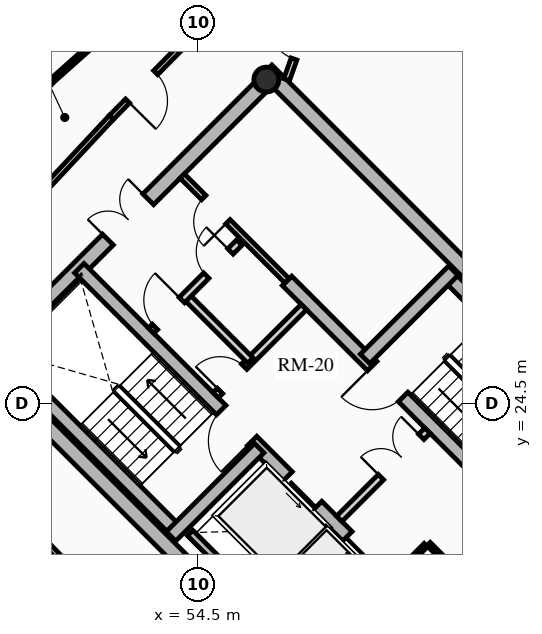
"""IFC4 building model, lengths in metres.
Left out: names, types, materials, properties, quantities, classifications, styles, units other than length and angle.
Written with IfcOpenShell. Run it as: python <this file> out.ifc"""

import sys

from ifc_helpers import new_model, si_unit, direction, frame, frame_2d, origin, origin_2d, place, context, subcontext, project, spatial, rectangle, hollow_circle, extrude, source, transform, mapped, element, fill, save


model = new_model("IFC4")
c1 = context("Model", 3, precision=1e-05, world=origin(), true_north=direction((0.0, 1.0)))
c2 = subcontext(c1, "Body", "Model", "MODEL_VIEW")
j1 = project(units=[si_unit("LENGTHUNIT", "METRE"), si_unit("PLANEANGLEUNIT", "RADIAN")], contexts=[c1])
p1 = place(None, origin())
s1 = spatial("IfcSite", under=j1, at=p1, CompositionType="ELEMENT")
p2 = place(p1, origin())
s2 = spatial("IfcBuilding", under=s1, at=p2, CompositionType="ELEMENT")
p3 = place(p2, frame((0.0, 0.0, 217.03)))
s3 = spatial("IfcBuildingStorey", under=s2, at=p3, CompositionType="ELEMENT", Elevation=217.03)
for number, where, z_axis, x_axis in (
    (1, (58.702, 15.732, 0.0), (0.0, 0.0, 1.0), (-0.707, 0.707, 0.0)),
    (2, (66.268, 23.298, 0.0), (0.0, 0.0, 1.0), (-0.707, 0.707, 0.0)),
):
    element("IfcWall", number, at=place(p3, frame(where, z_axis=z_axis, x_axis=x_axis)), inside=s3, PredefinedType="SHEAR", context=c2, shape_type="SweptSolid", body=[
        extrude(rectangle(XDim=14.1, YDim=0.4, at=frame_2d((7.05, 0.0))), origin(), (0.0, 0.0, 1.0), 2.91),
    ])
p4 = place(p3, frame((58.561, 15.873, 0.0), z_axis=(0.0, 0.0, 1.0), x_axis=(0.707106781187, 0.707106781187, 0.0)))
e3 = element("IfcWall", 3, at=p4, inside=s3, PredefinedType="SHEAR", context=c2, shape_type="SweptSolid", body=[
    extrude(rectangle(XDim=10.7, YDim=0.4, at=frame_2d((5.35, 0.0))), origin(), (0.0, 0.0, 1.0), 2.91),
])
m1 = source(origin(), c2, "Body", "SweptSolid", [
    extrude(rectangle(XDim=1.5, YDim=2.02, at=frame_2d((0.75, 1.01))), frame((0.0, 0.21, 0.0), z_axis=(0.0, -1.0, 0.0), x_axis=(1.0, 0.0, 0.0)), (0.0, 0.0, 1.0), 0.42),
])
p5 = place(p4, frame((5.45, 0.0, 0.0)))
e4 = element("IfcOpeningElement", 4, at=p5, cuts=e3, PredefinedType="OPENING", context=c2, shape_type="MappedRepresentation", body=[
    mapped(m1, transform((0.0, 0.0, 0.0), x_axis=(1.0, 0.0, 0.0), y_axis=(0.0, 1.0, 0.0), z_axis=(0.0, 0.0, 1.0), scale=1.0)),
])
p6 = place(p3, frame((48.873, 25.561, 0.0), z_axis=(0.0, 0.0, 1.0), x_axis=(0.707106781187, 0.707106781187, 0.0)))
e5 = element("IfcWall", 5, at=p6, inside=s3, PredefinedType="SHEAR", context=c2, shape_type="SweptSolid", body=[
    extrude(rectangle(XDim=10.7, YDim=0.4, at=frame_2d((5.35, 0.0))), origin(), (0.0, 0.0, 1.0), 2.91),
])
p7 = place(p6, frame((4.6, 0.0, 0.0)))
e6 = element("IfcOpeningElement", 6, at=p7, cuts=e5, PredefinedType="OPENING", context=c2, shape_type="MappedRepresentation", body=[
    mapped(m1, transform((0.0, 0.0, 0.0), x_axis=(1.0, 0.0, 0.0), y_axis=(0.0, 1.0, 0.0), z_axis=(0.0, 0.0, 1.0), scale=1.0)),
])
p8 = place(p3, frame((61.06, 18.373, 0.0), z_axis=(0.0, 0.0, 1.0), x_axis=(-0.707106781187, 0.707106781187, 0.0)))
e7 = element("IfcWall", 7, at=p8, inside=s3, PredefinedType="SHEAR", context=c2, shape_type="SweptSolid", body=[
    extrude(rectangle(XDim=13.7, YDim=0.35, at=frame_2d((6.85, 0.0))), origin(), (0.0, 0.0, 1.0), 2.91),
])
m2 = source(origin(), c2, "Body", "SweptSolid", [
    extrude(rectangle(XDim=1.1, YDim=2.015, at=frame_2d((0.55, 1.007))), frame((0.0, 0.185, 0.0), z_axis=(0.0, -1.0, 0.0), x_axis=(1.0, 0.0, 0.0)), (0.0, 0.0, 1.0), 0.37),
])
p9 = place(p8, frame((4.85, 0.0, 0.0)))
e8 = element("IfcOpeningElement", 8, at=p9, cuts=e7, PredefinedType="OPENING", context=c2, shape_type="MappedRepresentation", body=[
    mapped(m2, transform((0.0, 0.0, 0.0), x_axis=(1.0, 0.0, 0.0), y_axis=(0.0, 1.0, 0.0), z_axis=(0.0, 0.0, 1.0), scale=1.0)),
])
p10 = place(p8, frame((0.625, 0.0, 0.0)))
e9 = element("IfcOpeningElement", 9, at=p10, cuts=e7, PredefinedType="OPENING", context=c2, shape_type="MappedRepresentation", body=[
    mapped(m2, transform((0.0, 0.0, 0.0), x_axis=(1.0, 0.0, 0.0), y_axis=(0.0, 1.0, 0.0), z_axis=(0.0, 0.0, 1.0), scale=1.0)),
])
p11 = place(p8, frame((2.625, 0.0, 0.0)))
e10 = element("IfcOpeningElement", 10, at=p11, cuts=e7, PredefinedType="OPENING", context=c2, shape_type="MappedRepresentation", body=[
    mapped(m2, transform((0.0, 0.0, 0.0), x_axis=(1.0, 0.0, 0.0), y_axis=(0.0, 1.0, 0.0), z_axis=(0.0, 0.0, 1.0), scale=1.0)),
])
m3 = source(origin(), c2, "Body", "SweptSolid", [
    extrude(rectangle(XDim=1.15, YDim=2.02, at=frame_2d((0.575, 1.01))), frame((0.0, 0.185, 0.0), z_axis=(0.0, -1.0, 0.0), x_axis=(1.0, 0.0, 0.0)), (0.0, 0.0, 1.0), 0.37),
])
p12 = place(p8, frame((7.27, 0.0, 0.0)))
e11 = element("IfcOpeningElement", 11, at=p12, cuts=e7, PredefinedType="OPENING", context=c2, shape_type="MappedRepresentation", body=[
    mapped(m3, transform((0.0, 0.0, 0.0), x_axis=(1.0, 0.0, 0.0), y_axis=(0.0, 1.0, 0.0), z_axis=(0.0, 0.0, 1.0), scale=1.0)),
])
p13 = place(p3, frame((63.627, 20.94, 0.0), z_axis=(0.0, 0.0, 1.0), x_axis=(-0.707119496762, 0.707094065383, 0.0)))
e12 = element("IfcWall", 12, at=p13, inside=s3, PredefinedType="SHEAR", context=c2, shape_type="SweptSolid", body=[
    extrude(rectangle(XDim=9.6, YDim=0.35, at=frame_2d((4.8, 0.0))), origin(), (0.0, 0.0, 1.0), 2.91),
])
p14 = place(p13, frame((5.28, 0.0, 0.0)))
e13 = element("IfcOpeningElement", 13, at=p14, cuts=e12, PredefinedType="OPENING", context=c2, shape_type="MappedRepresentation", body=[
    mapped(m3, transform((0.0, 0.0, 0.0), x_axis=(1.0, 0.0, 0.0), y_axis=(0.0, 1.0, 0.0), z_axis=(0.0, 0.0, 1.0), scale=1.0)),
])
p15 = place(p3, frame((53.922, 21.141, 0.0), z_axis=(0.0, 0.0, 1.0), x_axis=(-0.707106781187, 0.707106781187, 0.0)))
e14 = element("IfcWall", 14, at=p15, inside=s3, PredefinedType="SHEAR", context=c2, shape_type="SweptSolid", body=[
    extrude(rectangle(XDim=6.695, YDim=0.35, at=frame_2d((3.348, 0.0))), origin(), (0.0, 0.0, 1.0), 2.91),
])
p16 = place(p3, frame((53.784, 21.003, 0.0), z_axis=(0.0, 0.0, 1.0), x_axis=(0.707106781187, 0.707106781187, 0.0)))
e15 = element("IfcWall", 15, at=p16, inside=s3, PredefinedType="SHEAR", context=c2, shape_type="SweptSolid", body=[
    extrude(rectangle(XDim=3.285, YDim=0.35, at=frame_2d((1.643, 0.0))), origin(), (0.0, 0.0, 1.0), 2.91),
])
p17 = place(p3, frame((65.812, 23.125, 0.0), z_axis=(0.0, 0.0, 1.0), x_axis=(-0.707106781187, 0.707106781187, 0.0)))
e16 = element("IfcWall", 16, at=p17, inside=s3, PredefinedType="SHEAR", context=c2, shape_type="SweptSolid", body=[
    extrude(rectangle(XDim=6.695, YDim=0.35, at=frame_2d((3.348, 0.0))), origin(), (0.0, 0.0, 1.0), 2.91),
])
p18 = place(p3, frame((58.893, 25.674, 0.0), z_axis=(0.0, 0.0, 1.0), x_axis=(0.707106781187, 0.707106781187, 0.0)))
e17 = element("IfcWall", 17, at=p18, inside=s3, PredefinedType="SHEAR", context=c2, shape_type="SweptSolid", body=[
    extrude(rectangle(XDim=3.285, YDim=0.35, at=frame_2d((1.643, 0.0))), origin(), (0.0, 0.0, 1.0), 2.91),
])
p19 = place(p3, frame((56.294, 33.024, 0.0), z_axis=(0.0, 0.0, 1.0), x_axis=(0.707106781187, 0.707106781187, 0.0)))
e18 = element("IfcColumn", 18, at=p19, inside=s3, PredefinedType="COLUMN", context=c2, shape_type="SweptSolid", body=[
    extrude(hollow_circle(Radius=0.33, WallThickness=0.025, at=origin_2d()), origin(), (0.0, 0.0, 1.0), 2.91),
])
p20 = place(p3, frame((55.888, 19.069, 0.0), z_axis=(0.0, 0.0, 1.0), x_axis=(0.707106781187, 0.707106781187, 0.0)))
e19 = element("IfcWall", 19, at=p20, inside=s3, PredefinedType="SHEAR", context=c2, shape_type="SweptSolid", body=[
    extrude(rectangle(XDim=2.97, YDim=0.2, at=frame_2d((1.485, 0.0))), origin(), (0.0, 0.0, 1.0), 2.91),
])
p21 = place(p3, frame((56.015, 19.366, 0.0), z_axis=(0.0, 0.0, 1.0), x_axis=(-0.707106781187, 0.707106781187, 0.0)))
e20 = element("IfcWall", 20, at=p21, inside=s3, PredefinedType="SHEAR", context=c2, shape_type="SweptSolid", body=[
    extrude(rectangle(XDim=2.44, YDim=0.2, at=frame_2d((1.22, 0.0))), origin(), (0.0, 0.0, 1.0), 2.91),
])
p22 = place(p3, frame((58.214, 21.467, 0.0), z_axis=(0.0, 0.0, 1.0), x_axis=(0.707106781187, 0.707106781187, 0.0)))
e21 = element("IfcWall", 21, at=p22, inside=s3, PredefinedType="PARTITIONING", context=c2, shape_type="SweptSolid", body=[
    extrude(rectangle(XDim=3.28, YDim=0.2, at=frame_2d((1.64, 0.0))), origin(), (0.0, 0.0, 1.0), 2.685),
])
m4 = source(origin(), c2, "Body", "SweptSolid", [
    extrude(rectangle(XDim=1.5, YDim=2.02, at=frame_2d((0.75, 1.01))), frame((0.0, 0.11, 0.0), z_axis=(0.0, -1.0, 0.0), x_axis=(1.0, 0.0, 0.0)), (0.0, 0.0, 1.0), 0.22),
])
p23 = place(p22, frame((1.55, 0.0, 0.0)))
e22 = element("IfcOpeningElement", 22, at=p23, cuts=e21, PredefinedType="OPENING", context=c2, shape_type="MappedRepresentation", body=[
    mapped(m4, transform((0.0, 0.0, 0.0), x_axis=(1.0, 0.0, 0.0), y_axis=(0.0, 1.0, 0.0), z_axis=(0.0, 0.0, 1.0), scale=1.0)),
])
p24 = place(p3, frame((54.961, 24.719, 0.0), z_axis=(0.0, 0.0, 1.0), x_axis=(0.707106781187, 0.707106781187, 0.0)))
e23 = element("IfcWall", 23, at=p24, inside=s3, PredefinedType="PARTITIONING", context=c2, shape_type="SweptSolid", body=[
    extrude(rectangle(XDim=3.28, YDim=0.2, at=frame_2d((1.64, 0.0))), origin(), (0.0, 0.0, 1.0), 2.685),
])
m5 = source(origin(), c2, "Body", "SweptSolid", [
    extrude(rectangle(XDim=0.9, YDim=2.005, at=frame_2d((0.45, 1.002))), frame((0.0, 0.11, 0.0), z_axis=(0.0, -1.0, 0.0), x_axis=(1.0, 0.0, 0.0)), (0.0, 0.0, 1.0), 0.22),
])
p25 = place(p24, frame((0.16, 0.0, 0.0)))
e24 = element("IfcOpeningElement", 24, at=p25, cuts=e23, PredefinedType="OPENING", context=c2, shape_type="MappedRepresentation", body=[
    mapped(m5, transform((0.0, 0.0, 0.0), x_axis=(1.0, 0.0, 0.0), y_axis=(0.0, 1.0, 0.0), z_axis=(0.0, 0.0, 1.0), scale=1.0)),
])
p26 = place(p3, frame((55.874, 25.631, 0.0), z_axis=(0.0, 0.0, 1.0), x_axis=(-0.707157639372, 0.707055919343, 0.0)))
e25 = element("IfcWall", 25, at=p26, inside=s3, PredefinedType="PARTITIONING", context=c2, shape_type="SweptSolid", body=[
    extrude(rectangle(XDim=2.4, YDim=0.2, at=frame_2d((1.2, 0.0))), origin(), (0.0, 0.0, 1.0), 2.685),
])
p27 = place(p3, frame((53.264, 26.416, 0.0), z_axis=(0.0, 0.0, 1.0), x_axis=(0.707106781187, 0.707106781187, 0.0)))
e26 = element("IfcWall", 26, at=p27, inside=s3, PredefinedType="PARTITIONING", context=c2, shape_type="SweptSolid", body=[
    extrude(rectangle(XDim=3.28, YDim=0.2, at=frame_2d((1.64, 0.0))), origin(), (0.0, 0.0, 1.0), 2.685),
])
m6 = source(origin(), c2, "Body", "SweptSolid", [
    extrude(rectangle(XDim=1.0, YDim=2.015, at=frame_2d((0.5, 1.007))), frame((0.0, 0.11, 0.0), z_axis=(0.0, -1.0, 0.0), x_axis=(1.0, 0.0, 0.0)), (0.0, 0.0, 1.0), 0.22),
])
p28 = place(p27, frame((0.14, 0.0, 0.0)))
e27 = element("IfcOpeningElement", 27, at=p28, cuts=e26, PredefinedType="OPENING", context=c2, shape_type="MappedRepresentation", body=[
    mapped(m6, transform((0.0, 0.0, 0.0), x_axis=(1.0, 0.0, 0.0), y_axis=(0.0, 1.0, 0.0), z_axis=(0.0, 0.0, 1.0), scale=1.0)),
])
p29 = place(p27, frame((2.05, 0.0, 0.0)))
e28 = element("IfcOpeningElement", 28, at=p29, cuts=e26, PredefinedType="OPENING", context=c2, shape_type="MappedRepresentation", body=[
    mapped(m5, transform((0.0, 0.0, 0.0), x_axis=(1.0, 0.0, 0.0), y_axis=(0.0, 1.0, 0.0), z_axis=(0.0, 0.0, 1.0), scale=1.0)),
])
p30 = place(p3, frame((61.835, 19.529, 0.0), z_axis=(0.0, 0.0, 1.0), x_axis=(-0.707174592913, 0.707038962956, 0.0)))
e29 = element("IfcWall", 29, at=p30, inside=s3, PredefinedType="PARTITIONING", context=c2, shape_type="SweptSolid", body=[
    extrude(rectangle(XDim=1.8, YDim=0.125, at=frame_2d((0.9, 0.0))), origin(), (0.0, 0.0, 1.0), 2.685),
])
m7 = source(origin(), c2, "Body", "SweptSolid", [
    extrude(rectangle(XDim=0.9, YDim=2.005, at=frame_2d((0.45, 1.002))), frame((0.0, 0.073, 0.0), z_axis=(0.0, -1.0, 0.0), x_axis=(1.0, 0.0, 0.0)), (0.0, 0.0, 1.0), 0.145),
])
p31 = place(p30, frame((0.42, 0.0, 0.0)))
e30 = element("IfcOpeningElement", 30, at=p31, cuts=e29, PredefinedType="OPENING", context=c2, shape_type="MappedRepresentation", body=[
    mapped(m7, transform((0.0, 0.0, 0.0), x_axis=(1.0, 0.0, 0.0), y_axis=(0.0, 1.0, 0.0), z_axis=(0.0, 0.0, 1.0), scale=1.0)),
])
p32 = place(p3, frame((59.713, 19.996, 0.0), z_axis=(0.0, 0.0, 1.0), x_axis=(0.707217726, 0.706995818963, 0.0)))
e31 = element("IfcWall", 31, at=p32, inside=s3, PredefinedType="PARTITIONING", context=c2, shape_type="SweptSolid", body=[
    extrude(rectangle(XDim=1.1, YDim=0.125, at=frame_2d((0.55, 0.0))), origin(), (0.0, 0.0, 1.0), 2.685),
])
p33 = place(p3, frame((56.839, 27.728, 0.0), z_axis=(0.0, 0.0, 1.0), x_axis=(-0.707106781187, 0.707106781187, 0.0)))
e32 = element("IfcWall", 32, at=p33, inside=s3, PredefinedType="PARTITIONING", context=c2, shape_type="SweptSolid", body=[
    extrude(rectangle(XDim=3.9, YDim=0.16, at=frame_2d((1.95, 0.0))), origin(), (0.0, 0.0, 1.0), 2.685),
])
m8 = source(origin(), c2, "Body", "SweptSolid", [
    extrude(rectangle(XDim=0.9, YDim=2.005, at=frame_2d((0.45, 1.002))), frame((0.0, 0.09, 0.0), z_axis=(0.0, -1.0, 0.0), x_axis=(1.0, 0.0, 0.0)), (0.0, 0.0, 1.0), 0.18),
])
p34 = place(p33, frame((2.2, 0.0, 0.0)))
e33 = element("IfcOpeningElement", 33, at=p34, cuts=e32, PredefinedType="OPENING", context=c2, shape_type="MappedRepresentation", body=[
    mapped(m8, transform((0.0, 0.0, 0.0), x_axis=(1.0, 0.0, 0.0), y_axis=(0.0, 1.0, 0.0), z_axis=(0.0, 0.0, 1.0), scale=1.0)),
])
p35 = place(p3, frame((54.506, 34.344, 0.0), z_axis=(0.0, 0.0, 1.0), x_axis=(-0.703053402247, -0.711137056824, 0.0)))
e34 = element("IfcWall", 34, at=p35, inside=s3, PredefinedType="PARTITIONING", context=c2, shape_type="SweptSolid", body=[
    extrude(rectangle(XDim=3.262, YDim=0.15, at=frame_2d((1.631, 0.0))), origin(), (0.0, 0.0, 1.0), 2.322),
])
m9 = source(origin(), c2, "Body", "SweptSolid", [
    extrude(rectangle(XDim=1.05, YDim=2.015, at=frame_2d((0.525, 1.007))), frame((0.0, 0.085, 0.0), z_axis=(0.0, -1.0, 0.0), x_axis=(1.0, 0.0, 0.0)), (0.0, 0.0, 1.0), 0.17),
])
p36 = place(p35, frame((1.599, 0.0, 0.0)))
e35 = element("IfcOpeningElement", 35, at=p36, cuts=e34, PredefinedType="OPENING", context=c2, shape_type="MappedRepresentation", body=[
    mapped(m9, transform((0.0, 0.0, 0.0), x_axis=(1.0, 0.0, 0.0), y_axis=(0.0, 1.0, 0.0), z_axis=(0.0, 0.0, 1.0), scale=1.0)),
])
p37 = place(p3, frame((52.212, 32.024, 0.0), z_axis=(0.0, 0.0, 1.0), x_axis=(-0.682158998173, -0.731203871169, 0.0)))
e36 = element("IfcWall", 36, at=p37, inside=s3, PredefinedType="PARTITIONING", context=c2, shape_type="SweptSolid", body=[
    extrude(rectangle(XDim=6.282, YDim=0.15, at=frame_2d((3.141, 0.0))), origin(), (0.0, 0.0, 1.0), 2.255),
])
p38 = place(p3, frame((48.052, 23.323, 0.0), z_axis=(0.0, 0.0, 1.0), x_axis=(0.696573981306, -0.717484974454, 0.0)))
e37 = element("IfcWall", 37, at=p38, inside=s3, PredefinedType="PARTITIONING", context=c2, shape_type="SweptSolid", body=[
    extrude(rectangle(XDim=5.849, YDim=0.15, at=frame_2d((2.925, 0.0))), origin(), (0.0, 0.0, 1.0), 2.685),
])
p39 = place(p3, frame((56.828, 33.021, 0.0), z_axis=(0.0, 0.0, 1.0), x_axis=(0.334788446034, 0.942293317605, 0.0)))
e38 = element("IfcWall", 38, at=p39, inside=s3, PredefinedType="PARTITIONING", context=c2, shape_type="SweptSolid", body=[
    extrude(rectangle(XDim=1.829, YDim=0.16, at=frame_2d((0.915, 0.0))), origin(), (0.0, 0.0, 1.0), 2.255),
])
m10 = source(origin(), c2, "Body", "SweptSolid", [
    extrude(rectangle(XDim=1.05, YDim=2.015, at=frame_2d((0.525, 1.007))), frame((0.0, 0.09, 0.0), z_axis=(0.0, -1.0, 0.0), x_axis=(1.0, 0.0, 0.0)), (0.0, 0.0, 1.0), 0.18),
])
p40 = place(p39, frame((0.579, 0.0, 0.0)))
e39 = element("IfcOpeningElement", 39, at=p40, cuts=e38, PredefinedType="OPENING", context=c2, shape_type="MappedRepresentation", body=[
    mapped(m10, transform((0.0, 0.0, 0.0), x_axis=(1.0, 0.0, 0.0), y_axis=(0.0, 1.0, 0.0), z_axis=(0.0, 0.0, 1.0), scale=1.0)),
])
p41 = place(p3, frame((53.206, 35.268, 0.0), z_axis=(0.0, 0.0, 1.0), x_axis=(-0.746677760999, -0.665185929819, 0.0)))
e40 = element("IfcWall", 40, at=p41, inside=s3, PredefinedType="PARTITIONING", context=c2, shape_type="SweptSolid", body=[
    extrude(rectangle(XDim=3.445, YDim=0.125, at=frame_2d((1.723, 0.0))), origin(), (0.0, 0.0, 1.0), 2.322),
])
p42 = place(p3, frame((50.634, 32.977, 0.0), z_axis=(0.0, 0.0, 1.0), x_axis=(-0.659241945747, -0.751930885765, 0.0)))
e41 = element("IfcWall", 41, at=p42, inside=s3, PredefinedType="PARTITIONING", context=c2, shape_type="SweptSolid", body=[
    extrude(rectangle(XDim=5.624, YDim=0.125, at=frame_2d((2.812, 0.0))), origin(), (0.0, 0.0, 1.0), 2.255),
])
p43 = place(p42, frame((2.362, 0.0, 0.0)))
e42 = element("IfcOpeningElement", 42, at=p43, cuts=e41, PredefinedType="OPENING", context=c2, shape_type="MappedRepresentation", body=[
    mapped(m7, transform((0.0, 0.0, 0.0), x_axis=(1.0, 0.0, 0.0), y_axis=(0.0, 1.0, 0.0), z_axis=(0.0, 0.0, 1.0), scale=1.0)),
])
p44 = place(p3, frame((47.377, 22.223, 0.0), z_axis=(0.0, 0.0, 1.0), x_axis=(0.676554417653, -0.736392639802, 0.0)))
e43 = element("IfcWall", 43, at=p44, inside=s3, PredefinedType="PARTITIONING", context=c2, shape_type="SweptSolid", body=[
    extrude(rectangle(XDim=5.553, YDim=0.125, at=frame_2d((2.776, 0.0))), origin(), (0.0, 0.0, 1.0), 2.685),
])
p45 = place(p44, frame((2.326, 0.0, 0.0)))
e44 = element("IfcOpeningElement", 44, at=p45, cuts=e43, PredefinedType="OPENING", context=c2, shape_type="MappedRepresentation", body=[
    mapped(m7, transform((0.0, 0.0, 0.0), x_axis=(1.0, 0.0, 0.0), y_axis=(0.0, 1.0, 0.0), z_axis=(0.0, 0.0, 1.0), scale=1.0)),
])
m11 = source(origin(), c2, "Body", "SweptSolid", [
    extrude(rectangle(XDim=1.1, YDim=2.015, at=frame_2d((0.55, 1.007))), frame((0.0, 0.025, 0.0), z_axis=(0.0, -1.0, 0.0), x_axis=(1.0, 0.0, 0.0)), (0.0, 0.0, 1.0), 0.05),
])
p46 = place(p9, origin())
e45 = element("IfcDoor", 45, at=p46, inside=s3, OperationType="SLIDING_TO_LEFT", PredefinedType="DOOR", context=c2, shape_type="MappedRepresentation", body=[
    mapped(m11, transform((0.0, 0.0, 0.0), x_axis=(1.0, 0.0, 0.0), y_axis=(0.0, 1.0, 0.0), z_axis=(0.0, 0.0, 1.0), scale=1.0)),
])
fill(e8, e45)
p47 = place(p11, origin())
e46 = element("IfcDoor", 46, at=p47, inside=s3, OperationType="SLIDING_TO_RIGHT", PredefinedType="DOOR", context=c2, shape_type="MappedRepresentation", body=[
    mapped(m11, transform((0.0, 0.0, 0.0), x_axis=(1.0, 0.0, 0.0), y_axis=(0.0, 1.0, 0.0), z_axis=(0.0, 0.0, 1.0), scale=1.0)),
])
fill(e10, e46)
m12 = source(origin(), c2, "Body", "SweptSolid", [
    extrude(rectangle(XDim=1.15, YDim=2.02, at=frame_2d((0.575, 1.01))), frame((0.0, 0.025, 0.0), z_axis=(0.0, -1.0, 0.0), x_axis=(1.0, 0.0, 0.0)), (0.0, 0.0, 1.0), 0.05),
])
p48 = place(p12, origin())
e47 = element("IfcDoor", 47, at=p48, inside=s3, OperationType="SINGLE_SWING_LEFT", PredefinedType="DOOR", context=c2, shape_type="MappedRepresentation", body=[
    mapped(m12, transform((0.0, 0.0, 0.0), x_axis=(1.0, 0.0, 0.0), y_axis=(0.0, 1.0, 0.0), z_axis=(0.0, 0.0, 1.0), scale=1.0)),
])
fill(e11, e47)
p49 = place(p14, origin())
e48 = element("IfcDoor", 48, at=p49, inside=s3, OperationType="SINGLE_SWING_RIGHT", PredefinedType="DOOR", context=c2, shape_type="MappedRepresentation", body=[
    mapped(m12, transform((0.0, 0.0, 0.0), x_axis=(1.0, 0.0, 0.0), y_axis=(0.0, 1.0, 0.0), z_axis=(0.0, 0.0, 1.0), scale=1.0)),
])
fill(e13, e48)
m13 = source(origin(), c2, "Body", "SweptSolid", [
    extrude(rectangle(XDim=1.5, YDim=2.02, at=frame_2d((0.75, 1.01))), frame((0.0, 0.025, 0.0), z_axis=(0.0, -1.0, 0.0), x_axis=(1.0, 0.0, 0.0)), (0.0, 0.0, 1.0), 0.05),
])
p50 = place(p7, origin())
e49 = element("IfcDoor", 49, at=p50, inside=s3, OperationType="DOUBLE_DOOR_SINGLE_SWING", PredefinedType="DOOR", context=c2, shape_type="MappedRepresentation", body=[
    mapped(m13, transform((0.0, 0.0, 0.0), x_axis=(1.0, 0.0, 0.0), y_axis=(0.0, 1.0, 0.0), z_axis=(0.0, 0.0, 1.0), scale=1.0)),
])
fill(e6, e49)
p51 = place(p23, origin())
e50 = element("IfcDoor", 50, at=p51, inside=s3, OperationType="DOUBLE_DOOR_SINGLE_SWING", PredefinedType="DOOR", context=c2, shape_type="MappedRepresentation", body=[
    mapped(m13, transform((0.0, 0.0, 0.0), x_axis=(1.0, 0.0, 0.0), y_axis=(0.0, 1.0, 0.0), z_axis=(0.0, 0.0, 1.0), scale=1.0)),
])
fill(e22, e50)
m14 = source(origin(), c2, "Body", "SweptSolid", [
    extrude(rectangle(XDim=0.9, YDim=2.005, at=frame_2d((0.45, 1.002))), frame((0.0, 0.025, 0.0), z_axis=(0.0, -1.0, 0.0), x_axis=(1.0, 0.0, 0.0)), (0.0, 0.0, 1.0), 0.05),
])
p52 = place(p25, origin())
e51 = element("IfcDoor", 51, at=p52, inside=s3, OperationType="SINGLE_SWING_LEFT", PredefinedType="DOOR", context=c2, shape_type="MappedRepresentation", body=[
    mapped(m14, transform((0.0, 0.0, 0.0), x_axis=(1.0, 0.0, 0.0), y_axis=(0.0, 1.0, 0.0), z_axis=(0.0, 0.0, 1.0), scale=1.0)),
])
fill(e24, e51)
m15 = source(origin(), c2, "Body", "SweptSolid", [
    extrude(rectangle(XDim=1.0, YDim=2.015, at=frame_2d((0.5, 1.007))), frame((0.0, 0.025, 0.0), z_axis=(0.0, -1.0, 0.0), x_axis=(1.0, 0.0, 0.0)), (0.0, 0.0, 1.0), 0.05),
])
p53 = place(p28, origin())
e52 = element("IfcDoor", 52, at=p53, inside=s3, OperationType="SINGLE_SWING_RIGHT", PredefinedType="DOOR", context=c2, shape_type="MappedRepresentation", body=[
    mapped(m15, transform((0.0, 0.0, 0.0), x_axis=(1.0, 0.0, 0.0), y_axis=(0.0, 1.0, 0.0), z_axis=(0.0, 0.0, 1.0), scale=1.0)),
])
fill(e27, e52)
p54 = place(p29, origin())
e53 = element("IfcDoor", 53, at=p54, inside=s3, OperationType="SINGLE_SWING_RIGHT", PredefinedType="DOOR", context=c2, shape_type="MappedRepresentation", body=[
    mapped(m14, transform((0.0, 0.0, 0.0), x_axis=(1.0, 0.0, 0.0), y_axis=(0.0, 1.0, 0.0), z_axis=(0.0, 0.0, 1.0), scale=1.0)),
])
fill(e28, e53)
p55 = place(p34, origin())
e54 = element("IfcDoor", 54, at=p55, inside=s3, OperationType="SINGLE_SWING_LEFT", PredefinedType="DOOR", context=c2, shape_type="MappedRepresentation", body=[
    mapped(m14, transform((0.0, 0.0, 0.0), x_axis=(1.0, 0.0, 0.0), y_axis=(0.0, 1.0, 0.0), z_axis=(0.0, 0.0, 1.0), scale=1.0)),
])
fill(e33, e54)
m16 = source(origin(), c2, "Body", "SweptSolid", [
    extrude(rectangle(XDim=1.05, YDim=2.015, at=frame_2d((0.525, 1.007))), frame((0.0, 0.025, 0.0), z_axis=(0.0, -1.0, 0.0), x_axis=(1.0, 0.0, 0.0)), (0.0, 0.0, 1.0), 0.05),
])
p56 = place(p40, origin())
e55 = element("IfcDoor", 55, at=p56, inside=s3, OperationType="SINGLE_SWING_RIGHT", PredefinedType="DOOR", context=c2, shape_type="MappedRepresentation", body=[
    mapped(m16, transform((0.0, 0.0, 0.0), x_axis=(1.0, 0.0, 0.0), y_axis=(0.0, 1.0, 0.0), z_axis=(0.0, 0.0, 1.0), scale=1.0)),
])
fill(e39, e55)
p57 = place(p36, origin())
e56 = element("IfcDoor", 56, at=p57, inside=s3, OperationType="SINGLE_SWING_RIGHT", PredefinedType="DOOR", context=c2, shape_type="MappedRepresentation", body=[
    mapped(m16, transform((0.0, 0.0, 0.0), x_axis=(1.0, 0.0, 0.0), y_axis=(0.0, 1.0, 0.0), z_axis=(0.0, 0.0, 1.0), scale=1.0)),
])
fill(e35, e56)
save(model, sys.argv[1])
